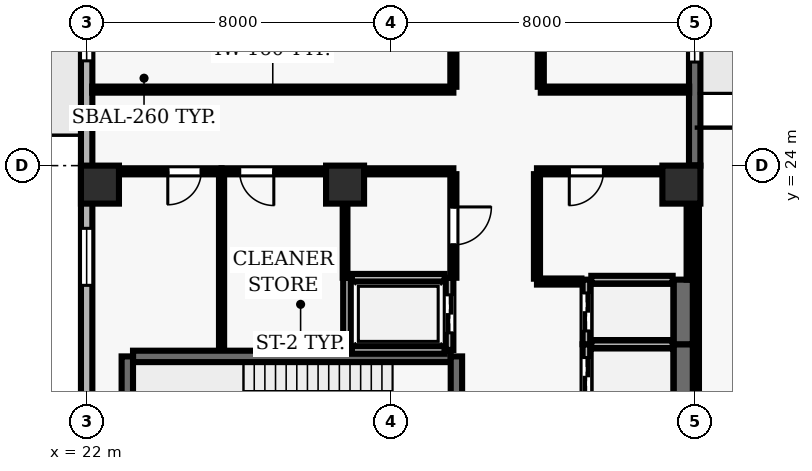
"""IFC4 building model, lengths in metres.
Left out: names, types, materials, properties, quantities, classifications, styles, units other than length and angle.
Written with IfcOpenShell. Run it as: python <this file> out.ifc"""

import sys

from ifc_helpers import new_model, si_unit, direction, frame, frame_2d, origin, origin_2d, place, context, subcontext, project, spatial, rectangle, extrude, element, fill, save


model = new_model("IFC4")
c1 = context("Model", 3, precision=1e-05, world=origin(), true_north=direction((0.0, 1.0)))
c2 = subcontext(c1, "Body", "Model", "MODEL_VIEW")
j1 = project(units=[si_unit("LENGTHUNIT", "METRE"), si_unit("PLANEANGLEUNIT", "RADIAN")], contexts=[c1])
p1 = place(None, origin())
s1 = spatial("IfcSite", under=j1, at=p1, CompositionType="ELEMENT")
p2 = place(p1, origin())
s2 = spatial("IfcBuilding", under=s1, at=p2, CompositionType="ELEMENT")
p3 = place(p2, frame((0.0, 0.0, 170.8)))
s3 = spatial("IfcBuildingStorey", under=s2, at=p3, CompositionType="ELEMENT", Elevation=170.8)
for number, where, z_axis, x_axis in (
    (1, (22.35, 23.5, 0.0), (0.0, 0.0, 1.0), (1.0, 0.0, 0.0)),
    (2, (28.8, 23.5, 0.0), (0.0, 0.0, 1.0), (1.0, 0.0, 0.0)),
    (3, (37.65, 23.5, 0.0), (0.0, 0.0, 1.0), (1.0, 0.0, 0.0)),
):
    element("IfcColumn", number, at=place(p3, frame(where, z_axis=z_axis, x_axis=x_axis)), inside=s3, PredefinedType="COLUMN", context=c2, shape_type="SweptSolid", body=[
        extrude(rectangle(XDim=1.0, YDim=1.0, at=origin_2d()), origin(), (0.0, 0.0, 1.0), 5.0),
    ])
p4 = place(p3, frame((38.0, 24.0, 0.0), z_axis=(0.0, 0.0, 1.0), x_axis=(0.0, 1.0, 0.0)))
e4 = element("IfcWall", 4, at=p4, inside=s3, PredefinedType="SOLIDWALL", context=c2, shape_type="SweptSolid", body=[
    extrude(rectangle(XDim=16.7, YDim=0.3, at=frame_2d((8.35, 0.0))), origin(), (0.0, 0.0, 1.0), 4.79),
])
p5 = place(p4, frame((7.45, 0.0, 0.0)))
e5 = element("IfcOpeningElement", 5, at=p5, cuts=e4, PredefinedType="OPENING", context=c2, shape_type="SweptSolid", body=[
    extrude(rectangle(XDim=1.0, YDim=2.2, at=frame_2d((0.5, 1.1))), frame((0.0, 0.16, 0.0), z_axis=(0.0, -1.0, 0.0), x_axis=(1.0, 0.0, 0.0)), (0.0, 0.0, 1.0), 0.32),
])
p6 = place(p4, frame((2.725, 0.0, 0.9)))
e6 = element("IfcOpeningElement", 6, at=p6, cuts=e4, PredefinedType="OPENING", context=c2, shape_type="SweptSolid", body=[
    extrude(rectangle(XDim=1.5, YDim=1.6, at=frame_2d((0.75, 0.8))), frame((0.0, 0.16, 0.0), z_axis=(0.0, -1.0, 0.0), x_axis=(1.0, 0.0, 0.0)), (0.0, 0.0, 1.0), 0.32),
])
p7 = place(p4, frame((11.475, 0.0, 0.9)))
e7 = element("IfcOpeningElement", 7, at=p7, cuts=e4, PredefinedType="OPENING", context=c2, shape_type="SweptSolid", body=[
    extrude(rectangle(XDim=1.5, YDim=1.6, at=frame_2d((0.75, 0.8))), frame((0.0, 0.16, 0.0), z_axis=(0.0, -1.0, 0.0), x_axis=(1.0, 0.0, 0.0)), (0.0, 0.0, 1.0), 0.32),
])
p8 = place(p3, frame((22.0, 40.7, 0.0), z_axis=(0.0, 0.0, 1.0), x_axis=(0.0, -1.0, 0.0)))
e8 = element("IfcWall", 8, at=p8, inside=s3, PredefinedType="SOLIDWALL", context=c2, shape_type="SweptSolid", body=[
    extrude(rectangle(XDim=38.2, YDim=0.3, at=frame_2d((19.1, 0.0))), origin(), (0.0, 0.0, 1.0), 4.79),
])
p9 = place(p8, frame((7.8, 0.0, 0.0)))
e9 = element("IfcOpeningElement", 9, at=p9, cuts=e8, PredefinedType="OPENING", context=c2, shape_type="SweptSolid", body=[
    extrude(rectangle(XDim=1.0, YDim=2.2, at=frame_2d((0.5, 1.1))), frame((0.0, 0.16, 0.0), z_axis=(0.0, -1.0, 0.0), x_axis=(1.0, 0.0, 0.0)), (0.0, 0.0, 1.0), 0.32),
])
p10 = place(p8, frame((1.979, 0.0, 0.9)))
e10 = element("IfcOpeningElement", 10, at=p10, cuts=e8, PredefinedType="OPENING", context=c2, shape_type="SweptSolid", body=[
    extrude(rectangle(XDim=1.5, YDim=1.8, at=frame_2d((0.75, 0.9))), frame((0.0, 0.16, 0.0), z_axis=(0.0, -1.0, 0.0), x_axis=(1.0, 0.0, 0.0)), (0.0, 0.0, 1.0), 0.32),
])
p11 = place(p8, frame((12.443, 0.0, 0.9)))
e11 = element("IfcOpeningElement", 11, at=p11, cuts=e8, PredefinedType="OPENING", context=c2, shape_type="SweptSolid", body=[
    extrude(rectangle(XDim=1.5, YDim=1.8, at=frame_2d((0.75, 0.9))), frame((0.0, 0.16, 0.0), z_axis=(0.0, -1.0, 0.0), x_axis=(1.0, 0.0, 0.0)), (0.0, 0.0, 1.0), 0.32),
])
p12 = place(p8, frame((18.35, 0.0, 0.9)))
e12 = element("IfcOpeningElement", 12, at=p12, cuts=e8, PredefinedType="OPENING", context=c2, shape_type="SweptSolid", body=[
    extrude(rectangle(XDim=1.5, YDim=1.8, at=frame_2d((0.75, 0.9))), frame((0.0, 0.16, 0.0), z_axis=(0.0, -1.0, 0.0), x_axis=(1.0, 0.0, 0.0)), (0.0, 0.0, 1.0), 0.32),
])
p13 = place(p8, frame((23.807, 0.0, 0.9)))
e13 = element("IfcOpeningElement", 13, at=p13, cuts=e8, PredefinedType="OPENING", context=c2, shape_type="SweptSolid", body=[
    extrude(rectangle(XDim=1.5, YDim=1.8, at=frame_2d((0.75, 0.9))), frame((0.0, 0.16, 0.0), z_axis=(0.0, -1.0, 0.0), x_axis=(1.0, 0.0, 0.0)), (0.0, 0.0, 1.0), 0.32),
])
p14 = place(p8, frame((29.264, 0.0, 0.9)))
e14 = element("IfcOpeningElement", 14, at=p14, cuts=e8, PredefinedType="OPENING", context=c2, shape_type="SweptSolid", body=[
    extrude(rectangle(XDim=1.5, YDim=1.8, at=frame_2d((0.75, 0.9))), frame((0.0, 0.16, 0.0), z_axis=(0.0, -1.0, 0.0), x_axis=(1.0, 0.0, 0.0)), (0.0, 0.0, 1.0), 0.32),
])
p15 = place(p3, frame((31.58, 18.98, 0.0), z_axis=(0.0, 0.0, 1.0), x_axis=(-1.0, 0.0, 0.0)))
e15 = element("IfcWall", 15, at=p15, inside=s3, PredefinedType="SHEAR", context=c2, shape_type="SweptSolid", body=[
    extrude(rectangle(XDim=8.36, YDim=0.3, at=frame_2d((4.18, 0.0))), origin(), (0.0, 0.0, 1.0), 4.79),
])
p16 = place(p3, frame((23.07, 18.98, 0.0), z_axis=(0.0, 0.0, 1.0), x_axis=(0.0, -1.0, 0.0)))
e16 = element("IfcWall", 16, at=p16, inside=s3, PredefinedType="SHEAR", context=c2, shape_type="SweptSolid", body=[
    extrude(rectangle(XDim=3.51, YDim=0.3, at=frame_2d((1.755, 0.0))), origin(), (0.0, 0.0, 1.0), 4.79),
])
p17 = place(p3, frame((31.73, 15.47, 0.0), z_axis=(0.0, 0.0, 1.0), x_axis=(0.0, 1.0, 0.0)))
e17 = element("IfcWall", 17, at=p17, inside=s3, PredefinedType="SHEAR", context=c2, shape_type="SweptSolid", body=[
    extrude(rectangle(XDim=3.51, YDim=0.3, at=frame_2d((1.755, 0.0))), origin(), (0.0, 0.0, 1.0), 4.79),
])
p18 = place(p17, frame((1.18, 0.0, 0.0)))
e18 = element("IfcOpeningElement", 18, at=p18, cuts=e17, PredefinedType="OPENING", context=c2, shape_type="SweptSolid", body=[
    extrude(rectangle(XDim=1.15, YDim=2.15, at=frame_2d((0.575, 1.075))), frame((0.0, 0.16, 0.0), z_axis=(0.0, -1.0, 0.0), x_axis=(1.0, 0.0, 0.0)), (0.0, 0.0, 1.0), 0.32),
])
p19 = place(p3, frame((35.15, 19.3, 0.0), z_axis=(0.0, 0.0, 1.0), x_axis=(0.0, -1.0, 0.0)))
e19 = element("IfcWall", 19, at=p19, inside=s3, PredefinedType="SOLIDWALL", context=c2, shape_type="SweptSolid", body=[
    extrude(rectangle(XDim=1.7, YDim=0.2, at=frame_2d((0.85, 0.0))), origin(), (0.0, 0.0, 1.0), 4.79),
])
p20 = place(p19, frame((0.35, 0.0, 0.0)))
e20 = element("IfcOpeningElement", 20, at=p20, cuts=e19, PredefinedType="OPENING", context=c2, shape_type="SweptSolid", body=[
    extrude(rectangle(XDim=1.0, YDim=2.1, at=frame_2d((0.5, 1.05))), frame((0.0, 0.11, 0.0), z_axis=(0.0, -1.0, 0.0), x_axis=(1.0, 0.0, 0.0)), (0.0, 0.0, 1.0), 0.22),
])
p21 = place(p3, frame((37.7, 17.6, 0.0), z_axis=(0.0, 0.0, 1.0), x_axis=(0.0, 1.0, 0.0)))
e21 = element("IfcWall", 21, at=p21, inside=s3, PredefinedType="SHEAR", context=c2, shape_type="SweptSolid", body=[
    extrude(rectangle(XDim=1.7, YDim=0.5, at=frame_2d((0.85, 0.0))), origin(), (0.0, 0.0, 1.0), 4.79),
])
p22 = place(p3, frame((37.42, 19.3, 0.0), z_axis=(0.0, 0.0, 1.0), x_axis=(-1.0, 0.0, 0.0)))
e22 = element("IfcWall", 22, at=p22, inside=s3, PredefinedType="SOLIDWALL", context=c2, shape_type="SweptSolid", body=[
    extrude(rectangle(XDim=2.14, YDim=0.2, at=frame_2d((1.07, 0.0))), origin(), (0.0, 0.0, 1.0), 4.79),
])
p23 = place(p3, frame((35.15, 21.0, 0.0), z_axis=(0.0, 0.0, 1.0), x_axis=(0.0, -1.0, 0.0)))
e23 = element("IfcWall", 23, at=p23, inside=s3, PredefinedType="SOLIDWALL", context=c2, shape_type="SweptSolid", body=[
    extrude(rectangle(XDim=1.7, YDim=0.2, at=frame_2d((0.85, 0.0))), origin(), (0.0, 0.0, 1.0), 4.79),
])
p24 = place(p23, frame((0.35, 0.0, 0.0)))
e24 = element("IfcOpeningElement", 24, at=p24, cuts=e23, PredefinedType="OPENING", context=c2, shape_type="SweptSolid", body=[
    extrude(rectangle(XDim=1.0, YDim=2.1, at=frame_2d((0.5, 1.05))), frame((0.0, 0.11, 0.0), z_axis=(0.0, -1.0, 0.0), x_axis=(1.0, 0.0, 0.0)), (0.0, 0.0, 1.0), 0.22),
])
p25 = place(p3, frame((37.7, 19.3, 0.0), z_axis=(0.0, 0.0, 1.0), x_axis=(0.0, 1.0, 0.0)))
e25 = element("IfcWall", 25, at=p25, inside=s3, PredefinedType="SHEAR", context=c2, shape_type="SweptSolid", body=[
    extrude(rectangle(XDim=1.7, YDim=0.5, at=frame_2d((0.85, 0.0))), origin(), (0.0, 0.0, 1.0), 4.79),
])
p26 = place(p3, frame((37.42, 21.0, 0.0), z_axis=(0.0, 0.0, 1.0), x_axis=(-1.0, 0.0, 0.0)))
e26 = element("IfcWall", 26, at=p26, inside=s3, PredefinedType="SOLIDWALL", context=c2, shape_type="SweptSolid", body=[
    extrude(rectangle(XDim=2.14, YDim=0.2, at=frame_2d((1.07, 0.0))), origin(), (0.0, 0.0, 1.0), 4.79),
])
p27 = place(p3, frame((28.85, 21.05, 0.0), z_axis=(0.0, 0.0, 1.0), x_axis=(0.0, -1.0, 0.0)))
e27 = element("IfcWall", 27, at=p27, inside=s3, PredefinedType="SOLIDWALL", context=c2, shape_type="SweptSolid", body=[
    extrude(rectangle(XDim=1.9, YDim=0.2, at=frame_2d((0.95, 0.0))), origin(), (0.0, 0.0, 1.0), 4.79),
])
p28 = place(p3, frame((31.55, 19.15, 0.0), z_axis=(0.0, 0.0, 1.0), x_axis=(0.0, 1.0, 0.0)))
e28 = element("IfcWall", 28, at=p28, inside=s3, PredefinedType="SOLIDWALL", context=c2, shape_type="SweptSolid", body=[
    extrude(rectangle(XDim=1.9, YDim=0.2, at=frame_2d((0.95, 0.0))), origin(), (0.0, 0.0, 1.0), 4.79),
])
p29 = place(p28, frame((0.45, 0.0, 0.0)))
e29 = element("IfcOpeningElement", 29, at=p29, cuts=e28, PredefinedType="OPENING", context=c2, shape_type="SweptSolid", body=[
    extrude(rectangle(XDim=1.0, YDim=2.1, at=frame_2d((0.5, 1.05))), frame((0.0, 0.11, 0.0), z_axis=(0.0, -1.0, 0.0), x_axis=(1.0, 0.0, 0.0)), (0.0, 0.0, 1.0), 0.22),
])
for number, where, z_axis, x_axis in (
    (30, (28.98, 19.15, 0.0), (0.0, 0.0, 1.0), (1.0, 0.0, 0.0)),
    (31, (31.42, 21.05, 0.0), (0.0, 0.0, 1.0), (-1.0, 0.0, 0.0)),
):
    element("IfcWall", number, at=place(p3, frame(where, z_axis=z_axis, x_axis=x_axis)), inside=s3, PredefinedType="SOLIDWALL", context=c2, shape_type="SweptSolid", body=[
        extrude(rectangle(XDim=2.44, YDim=0.2, at=frame_2d((1.22, 0.0))), origin(), (0.0, 0.0, 1.0), 4.79),
    ])
p30 = place(p3, frame((25.55, 23.85, 0.0), z_axis=(0.0, 0.0, 1.0), x_axis=(-1.0, 0.0, 0.0)))
e32 = element("IfcWall", 32, at=p30, inside=s3, PredefinedType="PARTITIONING", context=c2, shape_type="SweptSolid", body=[
    extrude(rectangle(XDim=3.35, YDim=0.16, at=frame_2d((1.675, 0.0))), origin(), (0.0, 0.0, 1.0), 4.246),
])
p31 = place(p30, frame((0.535, 0.0, 0.0)))
e33 = element("IfcOpeningElement", 33, at=p31, cuts=e32, PredefinedType="OPENING", context=c2, shape_type="SweptSolid", body=[
    extrude(rectangle(XDim=0.88, YDim=2.1, at=frame_2d((0.44, 1.05))), frame((0.0, 0.09, 0.0), z_axis=(0.0, -1.0, 0.0), x_axis=(1.0, 0.0, 0.0)), (0.0, 0.0, 1.0), 0.18),
])
p32 = place(p3, frame((28.8, 23.85, 0.0), z_axis=(0.0, 0.0, 1.0), x_axis=(-1.0, 0.0, 0.0)))
e34 = element("IfcWall", 34, at=p32, inside=s3, PredefinedType="PARTITIONING", context=c2, shape_type="SweptSolid", body=[
    extrude(rectangle(XDim=3.25, YDim=0.16, at=frame_2d((1.625, 0.0))), origin(), (0.0, 0.0, 1.0), 4.246),
])
p33 = place(p32, frame((1.875, 0.0, 0.0)))
e35 = element("IfcOpeningElement", 35, at=p33, cuts=e34, PredefinedType="OPENING", context=c2, shape_type="SweptSolid", body=[
    extrude(rectangle(XDim=0.9, YDim=2.1, at=frame_2d((0.45, 1.05))), frame((0.0, 0.09, 0.0), z_axis=(0.0, -1.0, 0.0), x_axis=(1.0, 0.0, 0.0)), (0.0, 0.0, 1.0), 0.18),
])
p34 = place(p3, frame((31.65, 23.85, 0.0), z_axis=(0.0, 0.0, 1.0), x_axis=(-1.0, 0.0, 0.0)))
e36 = element("IfcWall", 36, at=p34, inside=s3, PredefinedType="PARTITIONING", context=c2, shape_type="SweptSolid", body=[
    extrude(rectangle(XDim=2.85, YDim=0.16, at=frame_2d((1.425, 0.0))), origin(), (0.0, 0.0, 1.0), 4.246),
])
p35 = place(p3, frame((31.65, 26.0, 0.0), z_axis=(0.0, 0.0, 1.0), x_axis=(-1.0, 0.0, 0.0)))
e37 = element("IfcWall", 37, at=p35, inside=s3, PredefinedType="PARTITIONING", context=c2, shape_type="SweptSolid", body=[
    extrude(rectangle(XDim=9.505, YDim=0.16, at=frame_2d((4.752, 0.0))), origin(), (0.0, 0.0, 1.0), 4.79),
])
p36 = place(p3, frame((35.02, 20.95, 0.0), z_axis=(0.0, 0.0, 1.0), x_axis=(-1.0, 0.0, 0.0)))
e38 = element("IfcWall", 38, at=p36, inside=s3, PredefinedType="PARTITIONING", context=c2, shape_type="SweptSolid", body=[
    extrude(rectangle(XDim=1.17, YDim=0.16, at=frame_2d((0.585, 0.0))), origin(), (0.0, 0.0, 1.0), 4.79),
])
p37 = place(p3, frame((37.85, 23.85, 0.0), z_axis=(0.0, 0.0, 1.0), x_axis=(-1.0, 0.0, 0.0)))
e39 = element("IfcWall", 39, at=p37, inside=s3, PredefinedType="PARTITIONING", context=c2, shape_type="SweptSolid", body=[
    extrude(rectangle(XDim=4.0, YDim=0.16, at=frame_2d((2.0, 0.0))), origin(), (0.0, 0.0, 1.0), 4.246),
])
p38 = place(p37, frame((2.25, 0.0, 0.0)))
e40 = element("IfcOpeningElement", 40, at=p38, cuts=e39, PredefinedType="OPENING", context=c2, shape_type="SweptSolid", body=[
    extrude(rectangle(XDim=0.9, YDim=2.1, at=frame_2d((0.45, 1.05))), frame((0.0, 0.09, 0.0), z_axis=(0.0, -1.0, 0.0), x_axis=(1.0, 0.0, 0.0)), (0.0, 0.0, 1.0), 0.18),
])
p39 = place(p3, frame((37.855, 26.0, 0.0), z_axis=(0.0, 0.0, 1.0), x_axis=(-1.0, 0.0, 0.0)))
e41 = element("IfcWall", 41, at=p39, inside=s3, PredefinedType="PARTITIONING", context=c2, shape_type="SweptSolid", body=[
    extrude(rectangle(XDim=3.905, YDim=0.16, at=frame_2d((1.953, 0.0))), origin(), (0.0, 0.0, 1.0), 4.79),
])
p40 = place(p3, frame((25.55, 19.16, 0.0), z_axis=(0.0, 0.0, 1.0), x_axis=(0.0, 1.0, 0.0)))
e42 = element("IfcWall", 42, at=p40, inside=s3, PredefinedType="PARTITIONING", context=c2, shape_type="SweptSolid", body=[
    extrude(rectangle(XDim=4.615, YDim=0.135, at=frame_2d((2.308, 0.0))), origin(), (0.0, 0.0, 1.0), 4.79),
])
p41 = place(p3, frame((28.8, 23.775, 0.0), z_axis=(0.0, 0.0, 1.0), x_axis=(0.0, -1.0, 0.0)))
e43 = element("IfcWall", 43, at=p41, inside=s3, PredefinedType="PARTITIONING", context=c2, shape_type="SweptSolid", body=[
    extrude(rectangle(XDim=2.725, YDim=0.125, at=frame_2d((1.362, 0.0))), origin(), (0.0, 0.0, 1.0), 4.79),
])
p42 = place(p3, frame((31.65, 23.775, 0.0), z_axis=(0.0, 0.0, 1.0), x_axis=(0.0, -1.0, 0.0)))
e44 = element("IfcWall", 44, at=p42, inside=s3, PredefinedType="PARTITIONING", context=c2, shape_type="SweptSolid", body=[
    extrude(rectangle(XDim=2.725, YDim=0.16, at=frame_2d((1.362, 0.0))), origin(), (0.0, 0.0, 1.0), 4.79),
])
p43 = place(p42, frame((0.862, 0.0, 0.0)))
e45 = element("IfcOpeningElement", 45, at=p43, cuts=e44, PredefinedType="OPENING", context=c2, shape_type="SweptSolid", body=[
    extrude(rectangle(XDim=1.0, YDim=2.1, at=frame_2d((0.5, 1.05))), frame((0.0, 0.09, 0.0), z_axis=(0.0, -1.0, 0.0), x_axis=(1.0, 0.0, 0.0)), (0.0, 0.0, 1.0), 0.18),
])
p44 = place(p3, frame((31.65, 43.055, 0.0), z_axis=(0.0, 0.0, 1.0), x_axis=(0.0, -1.0, 0.0)))
e46 = element("IfcWall", 46, at=p44, inside=s3, PredefinedType="PARTITIONING", context=c2, shape_type="SweptSolid", body=[
    extrude(rectangle(XDim=16.98, YDim=0.16, at=frame_2d((8.49, 0.0))), origin(), (0.0, 0.0, 1.0), 4.79),
])
p45 = place(p44, frame((8.04, 0.0, 0.0)))
e47 = element("IfcOpeningElement", 47, at=p45, cuts=e46, PredefinedType="OPENING", context=c2, shape_type="SweptSolid", body=[
    extrude(rectangle(XDim=0.9, YDim=2.1, at=frame_2d((0.45, 1.05))), frame((0.0, 0.09, 0.0), z_axis=(0.0, -1.0, 0.0), x_axis=(1.0, 0.0, 0.0)), (0.0, 0.0, 1.0), 0.18),
])
p46 = place(p3, frame((33.85, 21.025, 0.0), z_axis=(0.0, 0.0, 1.0), x_axis=(0.0, 1.0, 0.0)))
e48 = element("IfcWall", 48, at=p46, inside=s3, PredefinedType="PARTITIONING", context=c2, shape_type="SweptSolid", body=[
    extrude(rectangle(XDim=2.75, YDim=0.16, at=frame_2d((1.375, 0.0))), origin(), (0.0, 0.0, 1.0), 4.79),
])
p47 = place(p3, frame((33.95, 26.075, 0.0), z_axis=(0.0, 0.0, 1.0), x_axis=(0.0, 1.0, 0.0)))
e49 = element("IfcWall", 49, at=p47, inside=s3, PredefinedType="PARTITIONING", context=c2, shape_type="SweptSolid", body=[
    extrude(rectangle(XDim=9.667, YDim=0.16, at=frame_2d((4.833, 0.0))), origin(), (0.0, 0.0, 1.0), 4.79),
])
p48 = place(p47, frame((4.383, 0.0, 0.0)))
e50 = element("IfcOpeningElement", 50, at=p48, cuts=e49, PredefinedType="OPENING", context=c2, shape_type="SweptSolid", body=[
    extrude(rectangle(XDim=0.9, YDim=2.1, at=frame_2d((0.45, 1.05))), frame((0.0, 0.09, 0.0), z_axis=(0.0, -1.0, 0.0), x_axis=(1.0, 0.0, 0.0)), (0.0, 0.0, 1.0), 0.18),
])
p49 = place(p3, frame((37.85, 21.0, 0.0), z_axis=(0.0, 0.0, 1.0), x_axis=(0.0, 1.0, 0.0)))
e51 = element("IfcWall", 51, at=p49, inside=s3, PredefinedType="PARTITIONING", context=c2, shape_type="SweptSolid", body=[
    extrude(rectangle(XDim=2.775, YDim=0.125, at=frame_2d((1.387, 0.0))), origin(), (0.0, 0.0, 1.0), 4.246),
])
p50 = place(p3, frame((38.05, 24.0, 0.0), z_axis=(0.0, 0.0, 1.0), x_axis=(0.0, -1.0, 0.0)))
e52 = element("IfcWall", 52, at=p50, inside=s3, PredefinedType="PARTITIONING", context=c2, shape_type="SweptSolid", body=[
    extrude(rectangle(XDim=7.925, YDim=0.125, at=frame_2d((3.962, 0.0))), origin(), (0.0, 0.0, 1.0), 4.246),
])
p51 = place(p6, origin())
e53 = element("IfcWindow", 53, at=p51, inside=s3, PartitioningType="SINGLE_PANEL", PredefinedType="WINDOW", context=c2, shape_type="SweptSolid", body=[
    extrude(rectangle(XDim=1.5, YDim=1.6, at=frame_2d((0.75, 0.8))), frame((0.0, 0.03, 0.0), z_axis=(0.0, -1.0, 0.0), x_axis=(1.0, 0.0, 0.0)), (0.0, 0.0, 1.0), 0.06),
])
fill(e6, e53)
p52 = place(p11, origin())
e54 = element("IfcWindow", 54, at=p52, inside=s3, PartitioningType="SINGLE_PANEL", PredefinedType="WINDOW", context=c2, shape_type="SweptSolid", body=[
    extrude(rectangle(XDim=1.5, YDim=1.8, at=frame_2d((0.75, 0.9))), frame((0.0, 0.03, 0.0), z_axis=(0.0, -1.0, 0.0), x_axis=(1.0, 0.0, 0.0)), (0.0, 0.0, 1.0), 0.06),
])
fill(e11, e54)
p53 = place(p12, origin())
e55 = element("IfcWindow", 55, at=p53, inside=s3, PartitioningType="SINGLE_PANEL", PredefinedType="WINDOW", context=c2, shape_type="SweptSolid", body=[
    extrude(rectangle(XDim=1.5, YDim=1.8, at=frame_2d((0.75, 0.9))), frame((0.0, 0.03, 0.0), z_axis=(0.0, -1.0, 0.0), x_axis=(1.0, 0.0, 0.0)), (0.0, 0.0, 1.0), 0.06),
])
fill(e12, e55)
p54 = place(p20, origin())
e56 = element("IfcDoor", 56, at=p54, inside=s3, OperationType="DOUBLE_DOOR_SLIDING", PredefinedType="DOOR", context=c2, shape_type="SweptSolid", body=[
    extrude(rectangle(XDim=1.0, YDim=2.1, at=frame_2d((0.5, 1.05))), frame((0.0, 0.025, 0.0), z_axis=(0.0, -1.0, 0.0), x_axis=(1.0, 0.0, 0.0)), (0.0, 0.0, 1.0), 0.05),
])
fill(e20, e56)
p55 = place(p24, origin())
e57 = element("IfcDoor", 57, at=p55, inside=s3, OperationType="DOUBLE_DOOR_SLIDING", PredefinedType="DOOR", context=c2, shape_type="SweptSolid", body=[
    extrude(rectangle(XDim=1.0, YDim=2.1, at=frame_2d((0.5, 1.05))), frame((0.0, 0.025, 0.0), z_axis=(0.0, -1.0, 0.0), x_axis=(1.0, 0.0, 0.0)), (0.0, 0.0, 1.0), 0.05),
])
fill(e24, e57)
p56 = place(p29, origin())
e58 = element("IfcDoor", 58, at=p56, inside=s3, OperationType="DOUBLE_DOOR_SLIDING", PredefinedType="DOOR", context=c2, shape_type="SweptSolid", body=[
    extrude(rectangle(XDim=1.0, YDim=2.1, at=frame_2d((0.5, 1.05))), frame((0.0, 0.025, 0.0), z_axis=(0.0, -1.0, 0.0), x_axis=(1.0, 0.0, 0.0)), (0.0, 0.0, 1.0), 0.05),
])
fill(e29, e58)
p57 = place(p38, origin())
e59 = element("IfcDoor", 59, at=p57, inside=s3, OperationType="SINGLE_SWING_RIGHT", PredefinedType="DOOR", context=c2, shape_type="SweptSolid", body=[
    extrude(rectangle(XDim=0.9, YDim=2.1, at=frame_2d((0.45, 1.05))), frame((0.0, 0.025, 0.0), z_axis=(0.0, -1.0, 0.0), x_axis=(1.0, 0.0, 0.0)), (0.0, 0.0, 1.0), 0.05),
])
fill(e40, e59)
p58 = place(p43, origin())
e60 = element("IfcDoor", 60, at=p58, inside=s3, OperationType="SINGLE_SWING_LEFT", PredefinedType="DOOR", context=c2, shape_type="SweptSolid", body=[
    extrude(rectangle(XDim=1.0, YDim=2.1, at=frame_2d((0.5, 1.05))), frame((0.0, 0.025, 0.0), z_axis=(0.0, -1.0, 0.0), x_axis=(1.0, 0.0, 0.0)), (0.0, 0.0, 1.0), 0.05),
])
fill(e45, e60)
p59 = place(p31, origin())
e61 = element("IfcDoor", 61, at=p59, inside=s3, OperationType="SINGLE_SWING_RIGHT", PredefinedType="DOOR", context=c2, shape_type="SweptSolid", body=[
    extrude(rectangle(XDim=0.88, YDim=2.1, at=frame_2d((0.44, 1.05))), frame((0.0, 0.025, 0.0), z_axis=(0.0, -1.0, 0.0), x_axis=(1.0, 0.0, 0.0)), (0.0, 0.0, 1.0), 0.05),
])
fill(e33, e61)
p60 = place(p33, origin())
e62 = element("IfcDoor", 62, at=p60, inside=s3, OperationType="SINGLE_SWING_LEFT", PredefinedType="DOOR", context=c2, shape_type="SweptSolid", body=[
    extrude(rectangle(XDim=0.9, YDim=2.1, at=frame_2d((0.45, 1.05))), frame((0.0, 0.025, 0.0), z_axis=(0.0, -1.0, 0.0), x_axis=(1.0, 0.0, 0.0)), (0.0, 0.0, 1.0), 0.05),
])
fill(e35, e62)
save(model, sys.argv[1])
